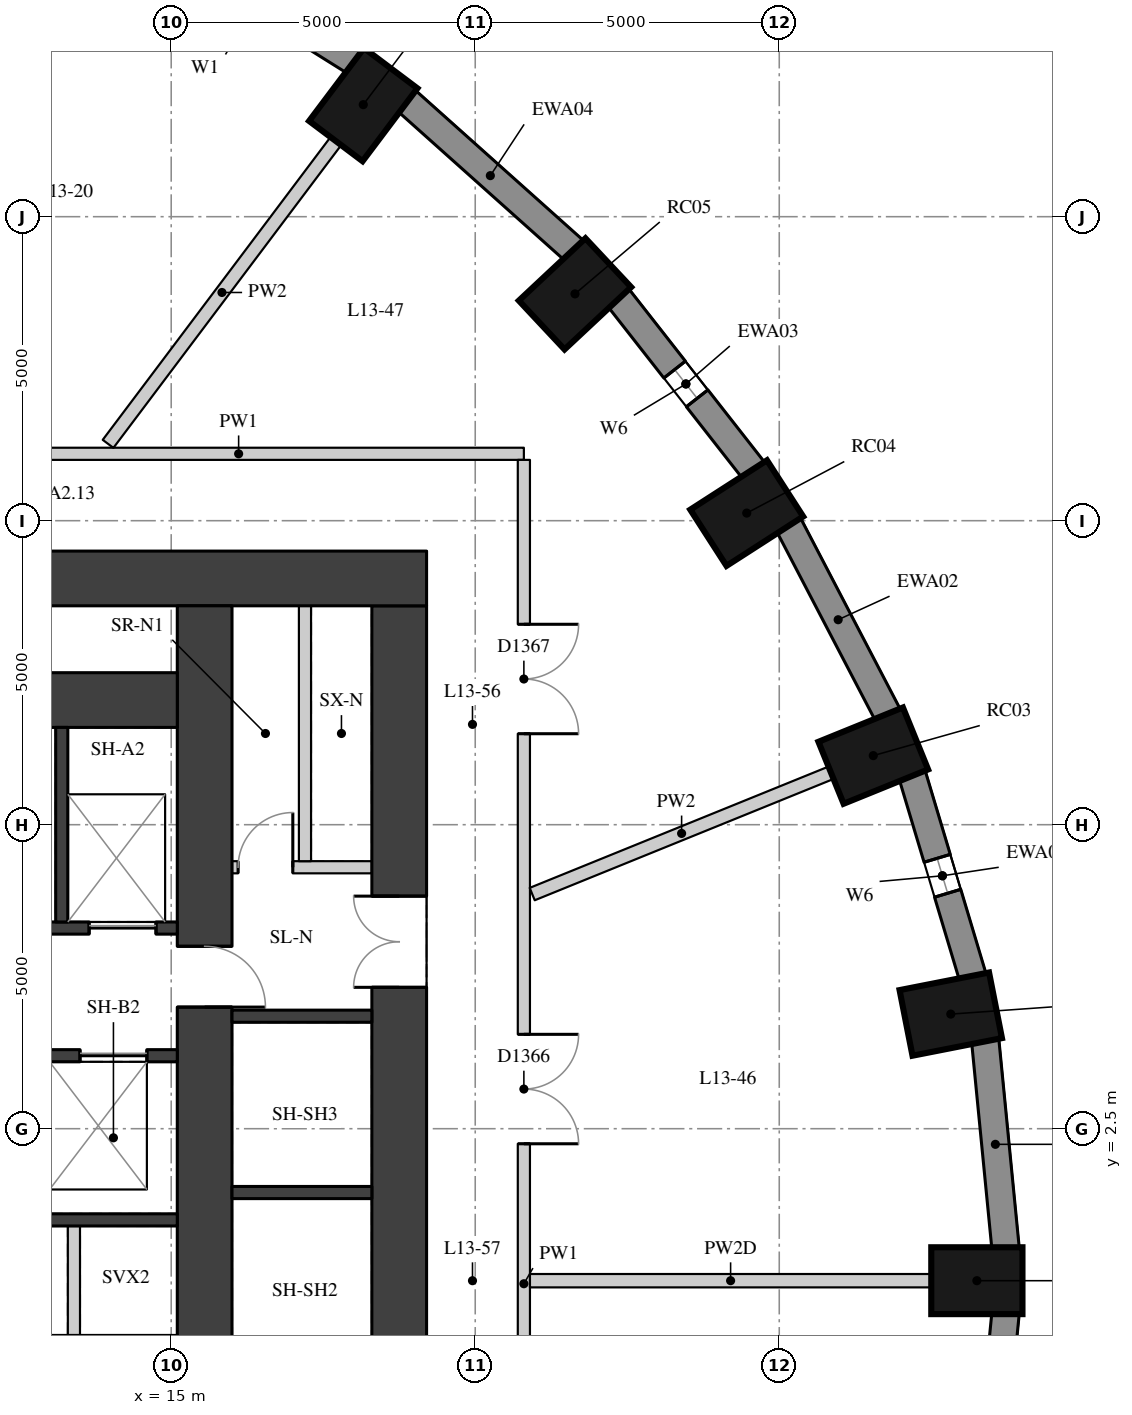
"""IFC4 building model, lengths in metres.
Left out: names, types, materials, properties, quantities, classifications, styles, units other than length and angle.
Written with IfcOpenShell. Run it as: python <this file> out.ifc"""

import sys

from ifc_helpers import new_model, si_unit, direction, frame, frame_2d, origin, origin_2d, place, context, subcontext, project, spatial, rectangle, extrude, element, fill, save


model = new_model("IFC4")
c1 = context("Model", 3, precision=1e-05, world=origin(), true_north=direction((0.0, 1.0)))
c2 = subcontext(c1, "Body", "Model", "MODEL_VIEW")
j1 = project(units=[si_unit("LENGTHUNIT", "METRE"), si_unit("PLANEANGLEUNIT", "RADIAN")], contexts=[c1])
p1 = place(None, origin())
s1 = spatial("IfcSite", under=j1, at=p1, CompositionType="ELEMENT")
p2 = place(p1, origin())
s2 = spatial("IfcBuilding", under=s1, at=p2, CompositionType="ELEMENT")
p3 = place(p2, frame((0.0, 0.0, 51.4)))
s3 = spatial("IfcBuildingStorey", under=s2, at=p3, CompositionType="ELEMENT", Elevation=51.4)
for number, where, z_axis, x_axis in (
    (1, (28.25, 0.0, 0.0), (0.0, 0.0, 1.0), (1.0, 0.0, 0.0)),
    (2, (27.821, 4.385, 0.0), (0.0, 0.0, 1.0), (0.981, 0.193, 0.0)),
    (3, (26.546, 8.636, 0.0), (0.0, 0.0, 1.0), (0.927, 0.376, 0.0)),
    (4, (24.465, 12.625, 0.0), (0.0, 0.0, 1.0), (0.841, 0.541, 0.0)),
    (5, (21.641, 16.23, 0.0), (0.0, 0.0, 1.0), (0.73, 0.683, 0.0)),
    (6, (18.159, 19.343, 0.0), (0.0, 0.0, 1.0), (0.601, 0.799, 0.0)),
):
    element("IfcColumn", number, at=place(p3, frame(where, z_axis=z_axis, x_axis=x_axis)), inside=s3, PredefinedType="COLUMN", context=c2, shape_type="SweptSolid", body=[
        extrude(rectangle(XDim=1.5, YDim=1.1, at=origin_2d()), origin(), (0.0, 0.0, 1.0), 3.3),
    ])
p4 = place(p3, frame((28.722, 0.53, 0.0), z_axis=(0.0, 0.0, 1.0), x_axis=(-0.097389581596, 0.995246336038, 0.0)))
e7 = element("IfcWall", 7, at=p4, inside=s3, PredefinedType="SOLIDWALL", context=c2, shape_type="SweptSolid", body=[
    extrude(rectangle(XDim=3.442, YDim=0.45, at=frame_2d((1.721, 0.0))), origin(), (0.0, 0.0, 1.0), 3.02),
])
p5 = place(p3, frame((28.182, 4.996, 0.0), z_axis=(0.0, 0.0, 1.0), x_axis=(-0.287064133733, 0.957911364963, 0.0)))
e8 = element("IfcWall", 8, at=p5, inside=s3, PredefinedType="SOLIDWALL", context=c2, shape_type="SweptSolid", body=[
    extrude(rectangle(XDim=3.473, YDim=0.45, at=frame_2d((1.737, 0.0))), origin(), (0.0, 0.0, 1.0), 3.02),
])
p6 = place(p5, frame((1.437, 0.0, 0.4)))
e9 = element("IfcOpeningElement", 9, at=p6, cuts=e8, PredefinedType="OPENING", context=c2, shape_type="SweptSolid", body=[
    extrude(rectangle(XDim=0.6, YDim=1.75, at=frame_2d((0.3, 0.875))), frame((0.0, 0.235, 0.0), z_axis=(0.0, -1.0, 0.0), x_axis=(1.0, 0.0, 0.0)), (0.0, 0.0, 1.0), 0.47),
])
p7 = place(p3, frame((26.786, 9.305, 0.0), z_axis=(0.0, 0.0, 1.0), x_axis=(-0.462492775226, 0.886623050041, 0.0)))
e10 = element("IfcWall", 10, at=p7, inside=s3, PredefinedType="SOLIDWALL", context=c2, shape_type="SweptSolid", body=[
    extrude(rectangle(XDim=3.532, YDim=0.45, at=frame_2d((1.766, 0.0))), origin(), (0.0, 0.0, 1.0), 3.02),
])
p8 = place(p3, frame((24.578, 13.328, 0.0), z_axis=(0.0, 0.0, 1.0), x_axis=(-0.616661975264, 0.787228053529, 0.0)))
e11 = element("IfcWall", 11, at=p8, inside=s3, PredefinedType="SOLIDWALL", context=c2, shape_type="SweptSolid", body=[
    extrude(rectangle(XDim=3.61, YDim=0.45, at=frame_2d((1.805, 0.0))), origin(), (0.0, 0.0, 1.0), 3.02),
])
p9 = place(p8, frame((1.505, 0.0, 0.4)))
e12 = element("IfcOpeningElement", 12, at=p9, cuts=e11, PredefinedType="OPENING", context=c2, shape_type="SweptSolid", body=[
    extrude(rectangle(XDim=0.6, YDim=1.75, at=frame_2d((0.3, 0.875))), frame((0.0, 0.235, 0.0), z_axis=(0.0, -1.0, 0.0), x_axis=(1.0, 0.0, 0.0)), (0.0, 0.0, 1.0), 0.47),
])
p10 = place(p3, frame((21.627, 16.943, 0.0), z_axis=(0.0, 0.0, 1.0), x_axis=(-0.745526233716, 0.66647628228, 0.0)))
e13 = element("IfcWall", 13, at=p10, inside=s3, PredefinedType="SOLIDWALL", context=c2, shape_type="SweptSolid", body=[
    extrude(rectangle(XDim=3.697, YDim=0.45, at=frame_2d((1.848, 0.0))), origin(), (0.0, 0.0, 1.0), 3.02),
])
p11 = place(p3, frame((18.023, 20.044, 0.0), z_axis=(0.0, 0.0, 1.0), x_axis=(-0.847635480093, 0.530579016629, 0.0)))
e14 = element("IfcWall", 14, at=p11, inside=s3, PredefinedType="SOLIDWALL", context=c2, shape_type="SweptSolid", body=[
    extrude(rectangle(XDim=3.782, YDim=0.45, at=frame_2d((1.891, 0.0))), origin(), (0.0, 0.0, 1.0), 3.02),
])
p12 = place(p11, frame((0.791, 0.0, 0.4)))
e15 = element("IfcOpeningElement", 15, at=p12, cuts=e14, PredefinedType="OPENING", context=c2, shape_type="SweptSolid", body=[
    extrude(rectangle(XDim=2.2, YDim=1.75, at=frame_2d((1.1, 0.875))), frame((0.0, 0.235, 0.0), z_axis=(0.0, -1.0, 0.0), x_axis=(1.0, 0.0, 0.0)), (0.0, 0.0, 1.0), 0.47),
])
p13 = place(p3, frame((28.387, -3.956, 0.0), z_axis=(0.0, 0.0, 1.0), x_axis=(0.097389581596, 0.995246336038, 0.0)))
e16 = element("IfcWall", 16, at=p13, inside=s3, PredefinedType="SOLIDWALL", context=c2, shape_type="SweptSolid", body=[
    extrude(rectangle(XDim=3.442, YDim=0.45, at=frame_2d((1.721, 0.0))), origin(), (0.0, 0.0, 1.0), 3.02),
])
p14 = place(p13, frame((1.421, 0.0, 0.4)))
e17 = element("IfcOpeningElement", 17, at=p14, cuts=e16, PredefinedType="OPENING", context=c2, shape_type="SweptSolid", body=[
    extrude(rectangle(XDim=0.6, YDim=1.75, at=frame_2d((0.3, 0.875))), frame((0.0, 0.235, 0.0), z_axis=(0.0, -1.0, 0.0), x_axis=(1.0, 0.0, 0.0)), (0.0, 0.0, 1.0), 0.47),
])
p15 = place(p3, frame((18.75, -11.1, 0.0), z_axis=(0.0, 0.0, 1.0), x_axis=(0.0, 1.0, 0.0)))
e18 = element("IfcWall", 18, at=p15, inside=s3, PredefinedType="SHEAR", context=c2, shape_type="SweptSolid", body=[
    extrude(rectangle(XDim=22.2, YDim=0.9, at=frame_2d((11.1, 0.0))), origin(), (0.0, 0.0, 1.0), 3.02),
])
p16 = place(p15, frame((15.925, 0.0, 0.0)))
e19 = element("IfcOpeningElement", 19, at=p16, cuts=e18, PredefinedType="OPENING", context=c2, shape_type="SweptSolid", body=[
    extrude(rectangle(XDim=1.5, YDim=2.1, at=frame_2d((0.75, 1.05))), frame((0.0, 0.46, 0.0), z_axis=(0.0, -1.0, 0.0), x_axis=(1.0, 0.0, 0.0)), (0.0, 0.0, 1.0), 0.92),
])
p17 = place(p15, frame((4.525, 0.0, 0.0)))
e20 = element("IfcOpeningElement", 20, at=p17, cuts=e18, PredefinedType="OPENING", context=c2, shape_type="SweptSolid", body=[
    extrude(rectangle(XDim=1.5, YDim=2.1, at=frame_2d((0.75, 1.05))), frame((0.0, 0.46, 0.0), z_axis=(0.0, -1.0, 0.0), x_axis=(1.0, 0.0, 0.0)), (0.0, 0.0, 1.0), 0.92),
])
p18 = place(p3, frame((4.0, 11.55, 0.0), z_axis=(0.0, 0.0, 1.0), x_axis=(1.0, 0.0, 0.0)))
e21 = element("IfcWall", 21, at=p18, inside=s3, PredefinedType="SHEAR", context=c2, shape_type="SweptSolid", body=[
    extrude(rectangle(XDim=15.2, YDim=0.9, at=frame_2d((7.6, 0.0))), origin(), (0.0, 0.0, 1.0), 3.02),
])
p19 = place(p3, frame((15.55, -11.1, 0.0), z_axis=(0.0, 0.0, 1.0), x_axis=(0.0, 1.0, 0.0)))
e22 = element("IfcWall", 22, at=p19, inside=s3, PredefinedType="SHEAR", context=c2, shape_type="SweptSolid", body=[
    extrude(rectangle(XDim=22.2, YDim=0.9, at=frame_2d((11.1, 0.0))), origin(), (0.0, 0.0, 1.0), 3.02),
])
p20 = place(p19, frame((15.6, 0.0, 0.0)))
e23 = element("IfcOpeningElement", 23, at=p20, cuts=e22, PredefinedType="OPENING", context=c2, shape_type="SweptSolid", body=[
    extrude(rectangle(XDim=1.0, YDim=2.1, at=frame_2d((0.5, 1.05))), frame((0.0, 0.46, 0.0), z_axis=(0.0, -1.0, 0.0), x_axis=(1.0, 0.0, 0.0)), (0.0, 0.0, 1.0), 0.92),
])
p21 = place(p19, frame((5.6, 0.0, 0.0)))
e24 = element("IfcOpeningElement", 24, at=p21, cuts=e22, PredefinedType="OPENING", context=c2, shape_type="SweptSolid", body=[
    extrude(rectangle(XDim=1.0, YDim=2.1, at=frame_2d((0.5, 1.05))), frame((0.0, 0.46, 0.0), z_axis=(0.0, -1.0, 0.0), x_axis=(1.0, 0.0, 0.0)), (0.0, 0.0, 1.0), 0.92),
])
p22 = place(p3, frame((4.9, 9.55, 0.0), z_axis=(0.0, 0.0, 1.0), x_axis=(1.0, 0.0, 0.0)))
e25 = element("IfcWall", 25, at=p22, inside=s3, PredefinedType="SHEAR", context=c2, shape_type="SweptSolid", body=[
    extrude(rectangle(XDim=10.2, YDim=0.9, at=frame_2d((5.1, 0.0))), origin(), (0.0, 0.0, 1.0), 3.02),
])
p23 = place(p3, frame((4.9, 5.8, 0.0), z_axis=(0.0, 0.0, 1.0), x_axis=(1.0, 0.0, 0.0)))
e26 = element("IfcWall", 26, at=p23, inside=s3, PredefinedType="SHEAR", context=c2, shape_type="SweptSolid", body=[
    extrude(rectangle(XDim=10.2, YDim=0.2, at=frame_2d((5.1, 0.0))), origin(), (0.0, 0.0, 1.0), 3.02),
])
p24 = place(p23, frame((6.75, 0.0, 0.0)))
e27 = element("IfcOpeningElement", 27, at=p24, cuts=e26, PredefinedType="OPENING", context=c2, shape_type="SweptSolid", body=[
    extrude(rectangle(XDim=1.1, YDim=2.1, at=frame_2d((0.55, 1.05))), frame((0.0, 0.11, 0.0), z_axis=(0.0, -1.0, 0.0), x_axis=(1.0, 0.0, 0.0)), (0.0, 0.0, 1.0), 0.22),
])
p25 = place(p23, frame((8.75, 0.0, 0.0)))
e28 = element("IfcOpeningElement", 28, at=p25, cuts=e26, PredefinedType="OPENING", context=c2, shape_type="SweptSolid", body=[
    extrude(rectangle(XDim=1.1, YDim=2.1, at=frame_2d((0.55, 1.05))), frame((0.0, 0.11, 0.0), z_axis=(0.0, -1.0, 0.0), x_axis=(1.0, 0.0, 0.0)), (0.0, 0.0, 1.0), 0.22),
])
p26 = place(p3, frame((4.9, 3.7, 0.0), z_axis=(0.0, 0.0, 1.0), x_axis=(1.0, 0.0, 0.0)))
e29 = element("IfcWall", 29, at=p26, inside=s3, PredefinedType="SHEAR", context=c2, shape_type="SweptSolid", body=[
    extrude(rectangle(XDim=10.2, YDim=0.2, at=frame_2d((5.1, 0.0))), origin(), (0.0, 0.0, 1.0), 3.02),
])
p27 = place(p26, frame((6.3, 0.0, 0.0)))
e30 = element("IfcOpeningElement", 30, at=p27, cuts=e29, PredefinedType="OPENING", context=c2, shape_type="SweptSolid", body=[
    extrude(rectangle(XDim=1.1, YDim=2.1, at=frame_2d((0.55, 1.05))), frame((0.0, 0.11, 0.0), z_axis=(0.0, -1.0, 0.0), x_axis=(1.0, 0.0, 0.0)), (0.0, 0.0, 1.0), 0.22),
])
p28 = place(p26, frame((8.6, 0.0, 0.0)))
e31 = element("IfcOpeningElement", 31, at=p28, cuts=e29, PredefinedType="OPENING", context=c2, shape_type="SweptSolid", body=[
    extrude(rectangle(XDim=1.1, YDim=2.1, at=frame_2d((0.55, 1.05))), frame((0.0, 0.11, 0.0), z_axis=(0.0, -1.0, 0.0), x_axis=(1.0, 0.0, 0.0)), (0.0, 0.0, 1.0), 0.22),
])
p29 = place(p3, frame((4.9, 1.0, 0.0), z_axis=(0.0, 0.0, 1.0), x_axis=(1.0, 0.0, 0.0)))
e32 = element("IfcWall", 32, at=p29, inside=s3, PredefinedType="SHEAR", context=c2, shape_type="SweptSolid", body=[
    extrude(rectangle(XDim=10.2, YDim=0.2, at=frame_2d((5.1, 0.0))), origin(), (0.0, 0.0, 1.0), 3.02),
])
p30 = place(p3, frame((13.2, 5.9, 0.0), z_axis=(0.0, 0.0, 1.0), x_axis=(0.0, 1.0, 0.0)))
e33 = element("IfcWall", 33, at=p30, inside=s3, PredefinedType="SHEAR", context=c2, shape_type="SweptSolid", body=[
    extrude(rectangle(XDim=3.2, YDim=0.2, at=frame_2d((1.6, 0.0))), origin(), (0.0, 0.0, 1.0), 3.02),
])
p31 = place(p3, frame((13.4, -0.9, 0.0), z_axis=(0.0, 0.0, 1.0), x_axis=(0.0, 1.0, 0.0)))
e34 = element("IfcWall", 34, at=p31, inside=s3, PredefinedType="PARTITIONING", context=c2, shape_type="SweptSolid", body=[
    extrude(rectangle(XDim=1.8, YDim=0.2, at=frame_2d((0.9, 0.0))), origin(), (0.0, 0.0, 1.0), 3.02),
])
for number, where, z_axis, x_axis in (
    (35, (16.0, 1.45, 0.0), (0.0, 0.0, 1.0), (1.0, 0.0, 0.0)),
    (36, (16.0, 4.35, 0.0), (0.0, 0.0, 1.0), (1.0, 0.0, 0.0)),
):
    element("IfcWall", number, at=place(p3, frame(where, z_axis=z_axis, x_axis=x_axis)), inside=s3, PredefinedType="SHEAR", context=c2, shape_type="SweptSolid", body=[
        extrude(rectangle(XDim=2.3, YDim=0.2, at=frame_2d((1.15, 0.0))), origin(), (0.0, 0.0, 1.0), 3.02),
    ])
p32 = place(p3, frame((16.0, 6.8, 0.0), z_axis=(0.0, 0.0, 1.0), x_axis=(1.0, 0.0, 0.0)))
e37 = element("IfcWall", 37, at=p32, inside=s3, PredefinedType="PARTITIONING", context=c2, shape_type="SweptSolid", body=[
    extrude(rectangle(XDim=2.3, YDim=0.2, at=frame_2d((1.15, 0.0))), origin(), (0.0, 0.0, 1.0), 3.02),
])
p33 = place(p32, frame((0.1, 0.0, 0.0)))
e38 = element("IfcOpeningElement", 38, at=p33, cuts=e37, PredefinedType="OPENING", context=c2, shape_type="SweptSolid", body=[
    extrude(rectangle(XDim=0.9, YDim=2.1, at=frame_2d((0.45, 1.05))), frame((0.0, 0.11, 0.0), z_axis=(0.0, -1.0, 0.0), x_axis=(1.0, 0.0, 0.0)), (0.0, 0.0, 1.0), 0.22),
])
p34 = place(p3, frame((17.2, 6.9, 0.0), z_axis=(0.0, 0.0, 1.0), x_axis=(0.0, 1.0, 0.0)))
e39 = element("IfcWall", 39, at=p34, inside=s3, PredefinedType="PARTITIONING", context=c2, shape_type="SweptSolid", body=[
    extrude(rectangle(XDim=4.2, YDim=0.2, at=frame_2d((2.1, 0.0))), origin(), (0.0, 0.0, 1.0), 3.02),
])
p35 = place(p3, frame((11.418, 13.6, 0.0), z_axis=(0.0, 0.0, 1.0), x_axis=(1.0, 0.0, 0.0)))
e40 = element("IfcWall", 40, at=p35, inside=s3, PredefinedType="PARTITIONING", context=c2, shape_type="SweptSolid", body=[
    extrude(rectangle(XDim=9.382, YDim=0.2, at=frame_2d((4.691, 0.0))), origin(), (0.0, 0.0, 1.0), 3.02),
])
p36 = place(p3, frame((20.8, 13.5, 0.0), z_axis=(0.0, 0.0, 1.0), x_axis=(0.0, -1.0, 0.0)))
e41 = element("IfcWall", 41, at=p36, inside=s3, PredefinedType="PARTITIONING", context=c2, shape_type="SweptSolid", body=[
    extrude(rectangle(XDim=27.1, YDim=0.2, at=frame_2d((13.55, 0.0))), origin(), (0.0, 0.0, 1.0), 3.02),
])
p37 = place(p36, frame((17.733, 0.0, 0.0)))
e42 = element("IfcOpeningElement", 42, at=p37, cuts=e41, PredefinedType="OPENING", context=c2, shape_type="SweptSolid", body=[
    extrude(rectangle(XDim=1.8, YDim=2.1, at=frame_2d((0.9, 1.05))), frame((0.0, 0.11, 0.0), z_axis=(0.0, -1.0, 0.0), x_axis=(1.0, 0.0, 0.0)), (0.0, 0.0, 1.0), 0.22),
])
p38 = place(p36, frame((9.448, 0.0, 0.0)))
e43 = element("IfcOpeningElement", 43, at=p38, cuts=e41, PredefinedType="OPENING", context=c2, shape_type="SweptSolid", body=[
    extrude(rectangle(XDim=1.8, YDim=2.1, at=frame_2d((0.9, 1.05))), frame((0.0, 0.11, 0.0), z_axis=(0.0, -1.0, 0.0), x_axis=(1.0, 0.0, 0.0)), (0.0, 0.0, 1.0), 0.22),
])
p39 = place(p36, frame((2.704, 0.0, 0.0)))
e44 = element("IfcOpeningElement", 44, at=p39, cuts=e41, PredefinedType="OPENING", context=c2, shape_type="SweptSolid", body=[
    extrude(rectangle(XDim=1.8, YDim=2.1, at=frame_2d((0.9, 1.05))), frame((0.0, 0.11, 0.0), z_axis=(0.0, -1.0, 0.0), x_axis=(1.0, 0.0, 0.0)), (0.0, 0.0, 1.0), 0.22),
])
p40 = place(p3, frame((27.5, 0.0, 0.0), z_axis=(0.0, 0.0, 1.0), x_axis=(-1.0, 0.0, 0.0)))
e45 = element("IfcWall", 45, at=p40, inside=s3, PredefinedType="PARTITIONING", context=c2, shape_type="SweptSolid", body=[
    extrude(rectangle(XDim=6.6, YDim=0.22, at=frame_2d((3.3, 0.0))), origin(), (0.0, 0.0, 1.0), 2.47),
])
p41 = place(p3, frame((25.851, 8.354, 0.0), z_axis=(0.0, 0.0, 1.0), x_axis=(-0.926546814299, -0.376179479653, 0.0)))
e46 = element("IfcWall", 46, at=p41, inside=s3, PredefinedType="PARTITIONING", context=c2, shape_type="SweptSolid", body=[
    extrude(rectangle(XDim=5.304, YDim=0.22, at=frame_2d((2.652, 0.0))), origin(), (0.0, 0.0, 1.0), 3.02),
])
p42 = place(p3, frame((17.708, 18.743, 0.0), z_axis=(0.0, 0.0, 1.0), x_axis=(-0.601177883261, -0.799115231164, 0.0)))
e47 = element("IfcWall", 47, at=p42, inside=s3, PredefinedType="PARTITIONING", context=c2, shape_type="SweptSolid", body=[
    extrude(rectangle(XDim=6.231, YDim=0.22, at=frame_2d((3.116, 0.0))), origin(), (0.0, 0.0, 1.0), 3.02),
])
p43 = place(p6, origin())
e48 = element("IfcWindow", 48, at=p43, inside=s3, PartitioningType="SINGLE_PANEL", PredefinedType="WINDOW", context=c2, shape_type="SweptSolid", body=[
    extrude(rectangle(XDim=0.6, YDim=1.75, at=frame_2d((0.3, 0.875))), frame((0.0, 0.035, 0.0), z_axis=(0.0, -1.0, 0.0), x_axis=(1.0, 0.0, 0.0)), (0.0, 0.0, 1.0), 0.06),
])
fill(e9, e48)
p44 = place(p9, origin())
e49 = element("IfcWindow", 49, at=p44, inside=s3, PartitioningType="SINGLE_PANEL", PredefinedType="WINDOW", context=c2, shape_type="SweptSolid", body=[
    extrude(rectangle(XDim=0.6, YDim=1.75, at=frame_2d((0.3, 0.875))), frame((0.0, 0.035, 0.0), z_axis=(0.0, -1.0, 0.0), x_axis=(1.0, 0.0, 0.0)), (0.0, 0.0, 1.0), 0.06),
])
fill(e12, e49)
p45 = place(p16, origin())
e50 = element("IfcDoor", 50, at=p45, inside=s3, OperationType="DOUBLE_DOOR_SINGLE_SWING", PredefinedType="DOOR", context=c2, shape_type="SweptSolid", body=[
    extrude(rectangle(XDim=1.5, YDim=2.1, at=frame_2d((0.75, 1.05))), frame((0.0, 0.025, 0.0), z_axis=(0.0, -1.0, 0.0), x_axis=(1.0, 0.0, 0.0)), (0.0, 0.0, 1.0), 0.05),
])
fill(e19, e50)
p46 = place(p25, origin())
e51 = element("IfcDoor", 51, at=p46, inside=s3, OperationType="DOUBLE_DOOR_SLIDING", PredefinedType="DOOR", context=c2, shape_type="SweptSolid", body=[
    extrude(rectangle(XDim=1.1, YDim=2.1, at=frame_2d((0.55, 1.05))), frame((0.0, 0.025, 0.0), z_axis=(0.0, -1.0, 0.0), x_axis=(1.0, 0.0, 0.0)), (0.0, 0.0, 1.0), 0.05),
])
fill(e28, e51)
p47 = place(p28, origin())
e52 = element("IfcDoor", 52, at=p47, inside=s3, OperationType="DOUBLE_DOOR_SLIDING", PredefinedType="DOOR", context=c2, shape_type="SweptSolid", body=[
    extrude(rectangle(XDim=1.1, YDim=2.1, at=frame_2d((0.55, 1.05))), frame((0.0, 0.025, 0.0), z_axis=(0.0, -1.0, 0.0), x_axis=(1.0, 0.0, 0.0)), (0.0, 0.0, 1.0), 0.05),
])
fill(e31, e52)
p48 = place(p20, origin())
e53 = element("IfcDoor", 53, at=p48, inside=s3, OperationType="SINGLE_SWING_RIGHT", PredefinedType="DOOR", context=c2, shape_type="SweptSolid", body=[
    extrude(rectangle(XDim=1.0, YDim=2.1, at=frame_2d((0.5, 1.05))), frame((0.0, 0.025, 0.0), z_axis=(0.0, -1.0, 0.0), x_axis=(1.0, 0.0, 0.0)), (0.0, 0.0, 1.0), 0.05),
])
fill(e23, e53)
p49 = place(p33, origin())
e54 = element("IfcDoor", 54, at=p49, inside=s3, OperationType="SINGLE_SWING_RIGHT", PredefinedType="DOOR", context=c2, shape_type="SweptSolid", body=[
    extrude(rectangle(XDim=0.9, YDim=2.1, at=frame_2d((0.45, 1.05))), frame((0.0, 0.025, 0.0), z_axis=(0.0, -1.0, 0.0), x_axis=(1.0, 0.0, 0.0)), (0.0, 0.0, 1.0), 0.05),
])
fill(e38, e54)
p50 = place(p38, origin())
e55 = element("IfcDoor", 55, at=p50, inside=s3, OperationType="DOUBLE_DOOR_SINGLE_SWING", PredefinedType="DOOR", context=c2, shape_type="SweptSolid", body=[
    extrude(rectangle(XDim=1.8, YDim=2.1, at=frame_2d((0.9, 1.05))), frame((0.0, 0.025, 0.0), z_axis=(0.0, -1.0, 0.0), x_axis=(1.0, 0.0, 0.0)), (0.0, 0.0, 1.0), 0.05),
])
fill(e43, e55)
p51 = place(p39, origin())
e56 = element("IfcDoor", 56, at=p51, inside=s3, OperationType="DOUBLE_DOOR_SINGLE_SWING", PredefinedType="DOOR", context=c2, shape_type="SweptSolid", body=[
    extrude(rectangle(XDim=1.8, YDim=2.1, at=frame_2d((0.9, 1.05))), frame((0.0, 0.025, 0.0), z_axis=(0.0, -1.0, 0.0), x_axis=(1.0, 0.0, 0.0)), (0.0, 0.0, 1.0), 0.05),
])
fill(e44, e56)
save(model, sys.argv[1])
